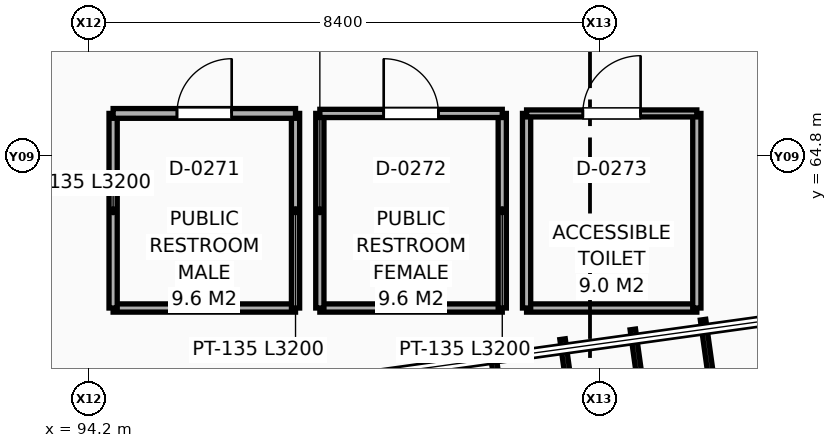
"""IFC4 building model, lengths in metres.
Left out: names, types, materials, properties, quantities, classifications, styles, units other than length and angle.
Written with IfcOpenShell. Run it as: python <this file> out.ifc"""

import sys

from ifc_helpers import new_model, si_unit, direction, frame, frame_2d, origin, place, context, subcontext, project, spatial, rectangle, extrude, element, fill, save


model = new_model("IFC4")
c1 = context("Model", 3, precision=1e-05, world=origin(), true_north=direction((0.0, 1.0)))
c2 = subcontext(c1, "Body", "Model", "MODEL_VIEW")
j1 = project(units=[si_unit("LENGTHUNIT", "METRE"), si_unit("PLANEANGLEUNIT", "RADIAN")], contexts=[c1])
p1 = place(None, origin())
s1 = spatial("IfcSite", under=j1, at=p1, CompositionType="ELEMENT")
p2 = place(p1, origin())
s2 = spatial("IfcBuilding", under=s1, at=p2, CompositionType="ELEMENT")
p3 = place(p2, frame((0.0, 0.0, 26.4)))
s3 = spatial("IfcBuildingStorey", under=s2, at=p3, CompositionType="ELEMENT", Elevation=26.4)
p4 = place(p3, frame((94.6, 62.3, 0.0), z_axis=(0.0, 0.0, 1.0), x_axis=(1.0, 0.0, 0.0)))
e1 = element("IfcWall", 1, at=p4, inside=s3, PredefinedType="PARTITIONING", context=c2, shape_type="SweptSolid", body=[
    extrude(rectangle(XDim=3.0, YDim=0.135, at=frame_2d((1.5, 0.0))), origin(), (0.0, 0.0, 1.0), 3.86),
])
for number, where, z_axis, x_axis in (
    (2, (97.6, 62.3, 0.0), (0.0, 0.0, 1.0), (0.0, 1.0, 0.0)),
    (3, (94.6, 62.3, 0.0), (0.0, 0.0, 1.0), (0.0, 1.0, 0.0)),
):
    element("IfcWall", number, at=place(p3, frame(where, z_axis=z_axis, x_axis=x_axis)), inside=s3, PredefinedType="PARTITIONING", context=c2, shape_type="SweptSolid", body=[
        extrude(rectangle(XDim=3.2, YDim=0.135, at=frame_2d((1.6, 0.0))), origin(), (0.0, 0.0, 1.0), 3.86),
    ])
p5 = place(p3, frame((94.6, 65.5, 0.0), z_axis=(0.0, 0.0, 1.0), x_axis=(1.0, 0.0, 0.0)))
e4 = element("IfcWall", 4, at=p5, inside=s3, PredefinedType="PARTITIONING", context=c2, shape_type="SweptSolid", body=[
    extrude(rectangle(XDim=3.0, YDim=0.16, at=frame_2d((1.5, 0.0))), origin(), (0.0, 0.0, 1.0), 3.86),
])
p6 = place(p5, frame((1.05, 0.0, 0.0)))
e5 = element("IfcOpeningElement", 5, at=p6, cuts=e4, PredefinedType="OPENING", context=c2, shape_type="SweptSolid", body=[
    extrude(rectangle(XDim=0.9, YDim=2.1, at=frame_2d((0.45, 1.05))), frame((0.0, 0.09, 0.0), z_axis=(0.0, -1.0, 0.0), x_axis=(1.0, 0.0, 0.0)), (0.0, 0.0, 1.0), 0.18),
])
p7 = place(p3, frame((98.0, 62.3, 0.0), z_axis=(0.0, 0.0, 1.0), x_axis=(1.0, 0.0, 0.0)))
e6 = element("IfcWall", 6, at=p7, inside=s3, PredefinedType="PARTITIONING", context=c2, shape_type="SweptSolid", body=[
    extrude(rectangle(XDim=3.0, YDim=0.135, at=frame_2d((1.5, 0.0))), origin(), (0.0, 0.0, 1.0), 3.86),
])
for number, where, z_axis, x_axis in (
    (7, (101.0, 62.3, 0.0), (0.0, 0.0, 1.0), (0.0, 1.0, 0.0)),
    (8, (98.0, 62.3, 0.0), (0.0, 0.0, 1.0), (0.0, 1.0, 0.0)),
):
    element("IfcWall", number, at=place(p3, frame(where, z_axis=z_axis, x_axis=x_axis)), inside=s3, PredefinedType="PARTITIONING", context=c2, shape_type="SweptSolid", body=[
        extrude(rectangle(XDim=3.2, YDim=0.135, at=frame_2d((1.6, 0.0))), origin(), (0.0, 0.0, 1.0), 3.86),
    ])
p8 = place(p3, frame((98.0, 65.5, 0.0), z_axis=(0.0, 0.0, 1.0), x_axis=(1.0, 0.0, 0.0)))
e9 = element("IfcWall", 9, at=p8, inside=s3, PredefinedType="PARTITIONING", context=c2, shape_type="SweptSolid", body=[
    extrude(rectangle(XDim=3.0, YDim=0.135, at=frame_2d((1.5, 0.0))), origin(), (0.0, 0.0, 1.0), 3.86),
])
p9 = place(p8, frame((1.05, 0.0, 0.0)))
e10 = element("IfcOpeningElement", 10, at=p9, cuts=e9, PredefinedType="OPENING", context=c2, shape_type="SweptSolid", body=[
    extrude(rectangle(XDim=0.9, YDim=2.1, at=frame_2d((0.45, 1.05))), frame((0.0, 0.077, 0.0), z_axis=(0.0, -1.0, 0.0), x_axis=(1.0, 0.0, 0.0)), (0.0, 0.0, 1.0), 0.155),
])
p10 = place(p3, frame((101.4, 62.3, 0.0), z_axis=(0.0, 0.0, 1.0), x_axis=(1.0, 0.0, 0.0)))
e11 = element("IfcWall", 11, at=p10, inside=s3, PredefinedType="PARTITIONING", context=c2, shape_type="SweptSolid", body=[
    extrude(rectangle(XDim=2.8, YDim=0.135, at=frame_2d((1.4, 0.0))), origin(), (0.0, 0.0, 1.0), 3.86),
])
for number, where, z_axis, x_axis in (
    (12, (104.2, 62.3, 0.0), (0.0, 0.0, 1.0), (0.0, 1.0, 0.0)),
    (13, (101.4, 62.3, 0.0), (0.0, 0.0, 1.0), (0.0, 1.0, 0.0)),
):
    element("IfcWall", number, at=place(p3, frame(where, z_axis=z_axis, x_axis=x_axis)), inside=s3, PredefinedType="PARTITIONING", context=c2, shape_type="SweptSolid", body=[
        extrude(rectangle(XDim=3.2, YDim=0.135, at=frame_2d((1.6, 0.0))), origin(), (0.0, 0.0, 1.0), 3.86),
    ])
p11 = place(p3, frame((101.4, 65.5, 0.0), z_axis=(0.0, 0.0, 1.0), x_axis=(1.0, 0.0, 0.0)))
e14 = element("IfcWall", 14, at=p11, inside=s3, PredefinedType="PARTITIONING", context=c2, shape_type="SweptSolid", body=[
    extrude(rectangle(XDim=2.8, YDim=0.115, at=frame_2d((1.4, 0.0))), origin(), (0.0, 0.0, 1.0), 3.664),
])
p12 = place(p11, frame((0.925, 0.0, 0.0)))
e15 = element("IfcOpeningElement", 15, at=p12, cuts=e14, PredefinedType="OPENING", context=c2, shape_type="SweptSolid", body=[
    extrude(rectangle(XDim=0.95, YDim=2.1, at=frame_2d((0.475, 1.05))), frame((0.0, 0.067, 0.0), z_axis=(0.0, -1.0, 0.0), x_axis=(1.0, 0.0, 0.0)), (0.0, 0.0, 1.0), 0.135),
])
p13 = place(p6, origin())
e16 = element("IfcDoor", 16, at=p13, inside=s3, OperationType="SINGLE_SWING_RIGHT", PredefinedType="DOOR", context=c2, shape_type="SweptSolid", body=[
    extrude(rectangle(XDim=0.9, YDim=2.1, at=frame_2d((0.45, 1.05))), frame((0.0, 0.025, 0.0), z_axis=(0.0, -1.0, 0.0), x_axis=(1.0, 0.0, 0.0)), (0.0, 0.0, 1.0), 0.05),
])
fill(e5, e16)
p14 = place(p9, origin())
e17 = element("IfcDoor", 17, at=p14, inside=s3, OperationType="SINGLE_SWING_LEFT", PredefinedType="DOOR", context=c2, shape_type="SweptSolid", body=[
    extrude(rectangle(XDim=0.9, YDim=2.1, at=frame_2d((0.45, 1.05))), frame((0.0, 0.025, 0.0), z_axis=(0.0, -1.0, 0.0), x_axis=(1.0, 0.0, 0.0)), (0.0, 0.0, 1.0), 0.05),
])
fill(e10, e17)
p15 = place(p12, origin())
e18 = element("IfcDoor", 18, at=p15, inside=s3, OperationType="SINGLE_SWING_RIGHT", PredefinedType="DOOR", context=c2, shape_type="SweptSolid", body=[
    extrude(rectangle(XDim=0.95, YDim=2.1, at=frame_2d((0.475, 1.05))), frame((0.0, 0.025, 0.0), z_axis=(0.0, -1.0, 0.0), x_axis=(1.0, 0.0, 0.0)), (0.0, 0.0, 1.0), 0.05),
])
fill(e15, e18)
save(model, sys.argv[1])
